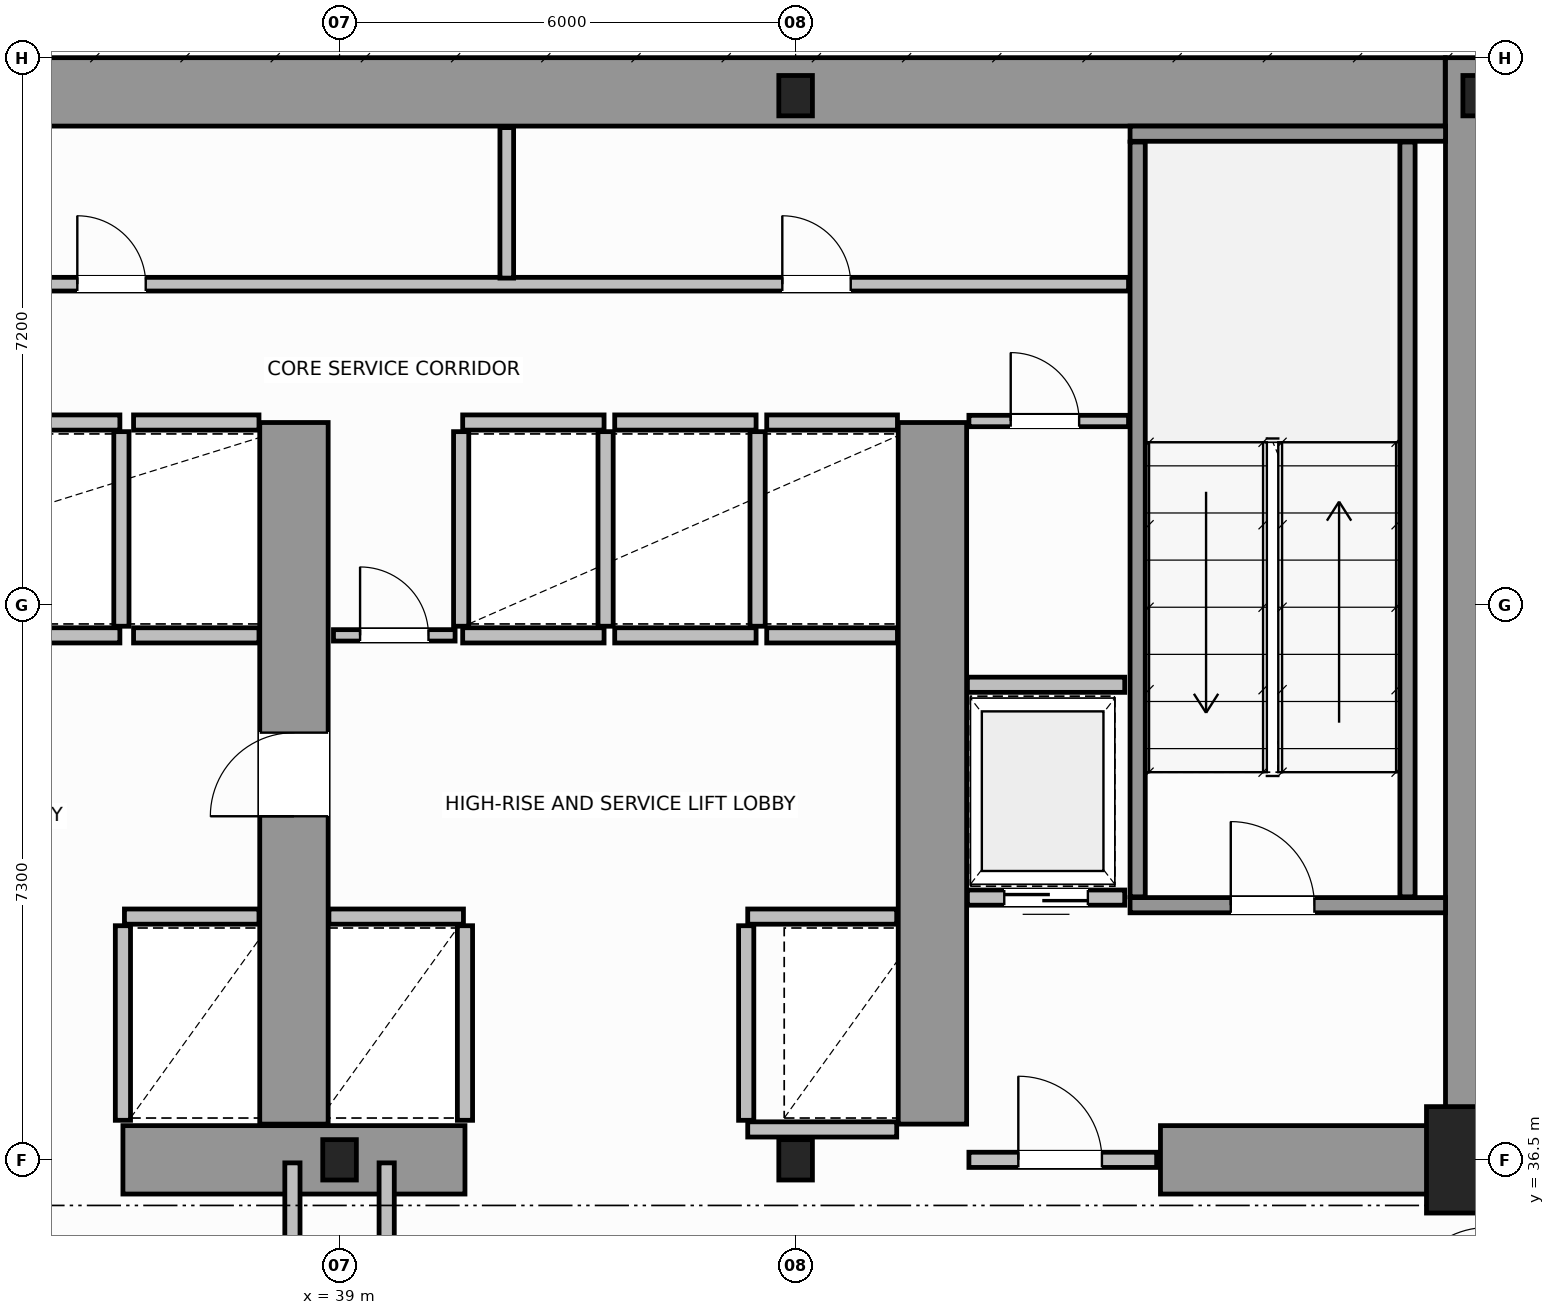
"""IFC4 building model, lengths in metres.
Left out: names, types, materials, properties, quantities, classifications, styles, units other than length and angle.
Written with IfcOpenShell. Run it as: python <this file> out.ifc"""

import sys

from ifc_helpers import new_model, si_unit, direction, frame, frame_2d, origin, origin_2d, place, context, subcontext, project, spatial, rectangle, i_section, extrude, source, transform, mapped, element, fill, save


model = new_model("IFC4")
c1 = context("Model", 3, precision=1e-05, world=origin(), true_north=direction((0.0, 1.0)))
c2 = subcontext(c1, "Body", "Model", "MODEL_VIEW")
j1 = project(units=[si_unit("LENGTHUNIT", "METRE"), si_unit("PLANEANGLEUNIT", "RADIAN")], contexts=[c1])
p1 = place(None, origin())
s1 = spatial("IfcSite", under=j1, at=p1, CompositionType="ELEMENT")
p2 = place(p1, origin())
s2 = spatial("IfcBuilding", under=s1, at=p2, CompositionType="ELEMENT")
p3 = place(p2, frame((0.0, 0.0, 83.4)))
s3 = spatial("IfcBuildingStorey", under=s2, at=p3, CompositionType="ELEMENT", Elevation=83.4)
m1 = source(origin(), c2, "Body", "SweptSolid", [
    extrude(i_section(OverallWidth=0.442, OverallDepth=0.531, WebThickness=0.065, FlangeThickness=0.076, FilletRadius=0.015, at=origin_2d()), origin(), (0.0, 0.0, 1.0), 4.8),
])
for number, where, z_axis, x_axis in (
    (1, (39.0, 36.5, 0.0), (0.0, 0.0, 1.0), (1.0, 0.0, 0.0)),
    (2, (45.0, 36.5, 0.0), (0.0, 0.0, 1.0), (1.0, 0.0, 0.0)),
):
    element("IfcColumn", number, at=place(p3, frame(where, z_axis=z_axis, x_axis=x_axis)), inside=s3, PredefinedType="COLUMN", context=c2, shape_type="MappedRepresentation", body=[
        mapped(m1, transform((0.0, 0.0, 0.0), scale=1.0)),
    ])
m2 = source(origin(), c2, "Body", "SweptSolid", [
    extrude(rectangle(XDim=1.4, YDim=1.4, at=origin_2d()), origin(), (0.0, 0.0, 1.0), 4.8),
])
p4 = place(p3, frame((54.0, 36.5, 0.0), z_axis=(0.0, 0.0, 1.0), x_axis=(1.0, 0.0, 0.0)))
e3 = element("IfcColumn", 3, at=p4, inside=s3, PredefinedType="COLUMN", context=c2, shape_type="MappedRepresentation", body=[
    mapped(m2, transform((0.0, 0.0, 0.0), scale=1.0)),
])
for number, where, z_axis, x_axis in (
    (4, (45.0, 50.5, 0.0), (0.0, 0.0, 1.0), (1.0, 0.0, 0.0)),
    (5, (54.0, 50.5, 0.0), (0.0, 0.0, 1.0), (1.0, 0.0, 0.0)),
):
    element("IfcColumn", number, at=place(p3, frame(where, z_axis=z_axis, x_axis=x_axis)), inside=s3, PredefinedType="COLUMN", context=c2, shape_type="MappedRepresentation", body=[
        mapped(m1, transform((0.0, 0.0, 0.0), scale=1.0)),
    ])
p5 = place(p3, frame((34.002, 50.55, 0.0), z_axis=(0.0, 0.0, 1.0), x_axis=(1.0, 0.0, 0.0)))
e6 = element("IfcWall", 6, at=p5, inside=s3, PredefinedType="SHEAR", context=c2, shape_type="SweptSolid", body=[
    extrude(rectangle(XDim=19.544, YDim=0.9, at=frame_2d((9.772, 0.0))), origin(), (0.0, 0.0, 1.0), 4.8),
])
p6 = place(p3, frame((54.0, 36.5, 0.0), z_axis=(0.0, 0.0, 1.0), x_axis=(0.0, 1.0, 0.0)))
e7 = element("IfcWall", 7, at=p6, inside=s3, PredefinedType="SHEAR", context=c2, shape_type="SweptSolid", body=[
    extrude(rectangle(XDim=14.5, YDim=0.9, at=frame_2d((7.25, 0.0))), origin(), (0.0, 0.0, 1.0), 4.8),
])
p7 = place(p3, frame((36.15, 36.5, 0.0), z_axis=(0.0, 0.0, 1.0), x_axis=(1.0, 0.0, 0.0)))
e8 = element("IfcWall", 8, at=p7, inside=s3, PredefinedType="SHEAR", context=c2, shape_type="SweptSolid", body=[
    extrude(rectangle(XDim=4.5, YDim=0.9, at=frame_2d((2.25, 0.0))), origin(), (0.0, 0.0, 1.0), 4.8),
])
p8 = place(p3, frame((49.8, 36.5, 0.0), z_axis=(0.0, 0.0, 1.0), x_axis=(1.0, 0.0, 0.0)))
e9 = element("IfcWall", 9, at=p8, inside=s3, PredefinedType="SHEAR", context=c2, shape_type="SweptSolid", body=[
    extrude(rectangle(XDim=3.73, YDim=0.9, at=frame_2d((1.865, 0.0))), origin(), (0.0, 0.0, 1.0), 3.34),
])
p9 = place(p3, frame((38.4, 36.97, 0.0), z_axis=(0.0, 0.0, 1.0), x_axis=(0.0, 1.0, 0.0)))
e10 = element("IfcWall", 10, at=p9, inside=s3, PredefinedType="SHEAR", context=c2, shape_type="SweptSolid", body=[
    extrude(rectangle(XDim=9.23, YDim=0.9, at=frame_2d((4.615, 0.0))), origin(), (0.0, 0.0, 1.0), 4.8),
])
p10 = place(p9, frame((4.05, 0.0, 0.0)))
e11 = element("IfcOpeningElement", 11, at=p10, cuts=e10, PredefinedType="OPENING", context=c2, shape_type="SweptSolid", body=[
    extrude(rectangle(XDim=1.1, YDim=2.15, at=frame_2d((0.55, 1.075))), frame((0.0, 0.46, 0.0), z_axis=(0.0, -1.0, 0.0), x_axis=(1.0, 0.0, 0.0)), (0.0, 0.0, 1.0), 0.92),
])
p11 = place(p3, frame((46.8, 36.97, 0.0), z_axis=(0.0, 0.0, 1.0), x_axis=(0.0, 1.0, 0.0)))
e12 = element("IfcWall", 12, at=p11, inside=s3, PredefinedType="SHEAR", context=c2, shape_type="SweptSolid", body=[
    extrude(rectangle(XDim=9.23, YDim=0.9, at=frame_2d((4.615, 0.0))), origin(), (0.0, 0.0, 1.0), 4.8),
])
p12 = place(p3, frame((49.4, 39.85, 0.0), z_axis=(0.0, 0.0, 1.0), x_axis=(1.0, 0.0, 0.0)))
e13 = element("IfcWall", 13, at=p12, inside=s3, PredefinedType="SOLIDWALL", context=c2, shape_type="SweptSolid", body=[
    extrude(rectangle(XDim=4.15, YDim=0.2, at=frame_2d((2.075, 0.0))), origin(), (0.0, 0.0, 1.0), 4.8),
])
p13 = place(p12, frame((1.325, 0.0, 0.0)))
e14 = element("IfcOpeningElement", 14, at=p13, cuts=e13, PredefinedType="OPENING", context=c2, shape_type="SweptSolid", body=[
    extrude(rectangle(XDim=1.1, YDim=2.15, at=frame_2d((0.55, 1.075))), frame((0.0, 0.11, 0.0), z_axis=(0.0, -1.0, 0.0), x_axis=(1.0, 0.0, 0.0)), (0.0, 0.0, 1.0), 0.22),
])
p14 = place(p3, frame((49.4, 50.0, 0.0), z_axis=(0.0, 0.0, 1.0), x_axis=(1.0, 0.0, 0.0)))
e15 = element("IfcWall", 15, at=p14, inside=s3, PredefinedType="SOLIDWALL", context=c2, shape_type="SweptSolid", body=[
    extrude(rectangle(XDim=4.15, YDim=0.2, at=frame_2d((2.075, 0.0))), origin(), (0.0, 0.0, 1.0), 4.8),
])
for number, where, z_axis, x_axis in (
    (16, (49.5, 39.96, 0.0), (0.0, 0.0, 1.0), (0.0, 1.0, 0.0)),
    (17, (53.05, 39.96, 0.0), (0.0, 0.0, 1.0), (0.0, 1.0, 0.0)),
):
    element("IfcWall", number, at=place(p3, frame(where, z_axis=z_axis, x_axis=x_axis)), inside=s3, PredefinedType="SOLIDWALL", context=c2, shape_type="SweptSolid", body=[
        extrude(rectangle(XDim=9.93, YDim=0.2, at=frame_2d((4.965, 0.0))), origin(), (0.0, 0.0, 1.0), 4.8),
    ])
p15 = place(p3, frame((47.28, 36.5, 0.0), z_axis=(0.0, 0.0, 1.0), x_axis=(1.0, 0.0, 0.0)))
e18 = element("IfcWall", 18, at=p15, inside=s3, PredefinedType="SOLIDWALL", context=c2, shape_type="SweptSolid", body=[
    extrude(rectangle(XDim=2.47, YDim=0.2, at=frame_2d((1.235, 0.0))), origin(), (0.0, 0.0, 1.0), 3.33),
])
p16 = place(p15, frame((0.65, 0.0, 0.0)))
e19 = element("IfcOpeningElement", 19, at=p16, cuts=e18, PredefinedType="OPENING", context=c2, shape_type="SweptSolid", body=[
    extrude(rectangle(XDim=1.1, YDim=2.15, at=frame_2d((0.55, 1.075))), frame((0.0, 0.11, 0.0), z_axis=(0.0, -1.0, 0.0), x_axis=(1.0, 0.0, 0.0)), (0.0, 0.0, 1.0), 0.22),
])
p17 = place(p3, frame((36.17, 39.7, 0.0), z_axis=(0.0, 0.0, 1.0), x_axis=(1.0, 0.0, 0.0)))
e20 = element("IfcWall", 20, at=p17, inside=s3, PredefinedType="SOLIDWALL", context=c2, shape_type="SweptSolid", body=[
    extrude(rectangle(XDim=1.77, YDim=0.2, at=frame_2d((0.885, 0.0))), origin(), (0.0, 0.0, 1.0), 4.54),
])
p18 = place(p3, frame((36.15, 37.02, 0.0), z_axis=(0.0, 0.0, 1.0), x_axis=(0.0, 1.0, 0.0)))
e21 = element("IfcWall", 21, at=p18, inside=s3, PredefinedType="SOLIDWALL", context=c2, shape_type="SweptSolid", body=[
    extrude(rectangle(XDim=2.56, YDim=0.2, at=frame_2d((1.28, 0.0))), origin(), (0.0, 0.0, 1.0), 4.54),
])
for number, where, z_axis, x_axis in (
    (22, (34.19, 43.4, 0.0), (0.0, 0.0, 1.0), (1.0, 0.0, 0.0)),
    (23, (34.19, 46.2, 0.0), (0.0, 0.0, 1.0), (1.0, 0.0, 0.0)),
):
    element("IfcWall", number, at=place(p3, frame(where, z_axis=z_axis, x_axis=x_axis)), inside=s3, PredefinedType="SOLIDWALL", context=c2, shape_type="SweptSolid", body=[
        extrude(rectangle(XDim=1.92, YDim=0.2, at=frame_2d((0.96, 0.0))), origin(), (0.0, 0.0, 1.0), 4.54),
    ])
p19 = place(p3, frame((36.13, 43.52, 0.0), z_axis=(0.0, 0.0, 1.0), x_axis=(0.0, 1.0, 0.0)))
e24 = element("IfcWall", 24, at=p19, inside=s3, PredefinedType="SOLIDWALL", context=c2, shape_type="SweptSolid", body=[
    extrude(rectangle(XDim=2.56, YDim=0.2, at=frame_2d((1.28, 0.0))), origin(), (0.0, 0.0, 1.0), 4.54),
])
for number, where, z_axis, x_axis in (
    (25, (36.29, 43.4, 0.0), (0.0, 0.0, 1.0), (1.0, 0.0, 0.0)),
    (26, (36.29, 46.2, 0.0), (0.0, 0.0, 1.0), (1.0, 0.0, 0.0)),
):
    element("IfcWall", number, at=place(p3, frame(where, z_axis=z_axis, x_axis=x_axis)), inside=s3, PredefinedType="SOLIDWALL", context=c2, shape_type="SweptSolid", body=[
        extrude(rectangle(XDim=1.65, YDim=0.2, at=frame_2d((0.825, 0.0))), origin(), (0.0, 0.0, 1.0), 4.54),
    ])
p20 = place(p3, frame((38.86, 39.7, 0.0), z_axis=(0.0, 0.0, 1.0), x_axis=(1.0, 0.0, 0.0)))
e27 = element("IfcWall", 27, at=p20, inside=s3, PredefinedType="SOLIDWALL", context=c2, shape_type="SweptSolid", body=[
    extrude(rectangle(XDim=1.77, YDim=0.2, at=frame_2d((0.885, 0.0))), origin(), (0.0, 0.0, 1.0), 4.54),
])
p21 = place(p3, frame((40.65, 37.02, 0.0), z_axis=(0.0, 0.0, 1.0), x_axis=(0.0, 1.0, 0.0)))
e28 = element("IfcWall", 28, at=p21, inside=s3, PredefinedType="SOLIDWALL", context=c2, shape_type="SweptSolid", body=[
    extrude(rectangle(XDim=2.56, YDim=0.2, at=frame_2d((1.28, 0.0))), origin(), (0.0, 0.0, 1.0), 4.54),
])
p22 = place(p3, frame((44.37, 39.7, 0.0), z_axis=(0.0, 0.0, 1.0), x_axis=(1.0, 0.0, 0.0)))
e29 = element("IfcWall", 29, at=p22, inside=s3, PredefinedType="SOLIDWALL", context=c2, shape_type="SweptSolid", body=[
    extrude(rectangle(XDim=1.96, YDim=0.2, at=frame_2d((0.98, 0.0))), origin(), (0.0, 0.0, 1.0), 4.54),
])
p23 = place(p3, frame((44.37, 36.9, 0.0), z_axis=(0.0, 0.0, 1.0), x_axis=(1.0, 0.0, 0.0)))
e30 = element("IfcWall", 30, at=p23, inside=s3, PredefinedType="SOLIDWALL", context=c2, shape_type="SweptSolid", body=[
    extrude(rectangle(XDim=1.96, YDim=0.2, at=frame_2d((0.98, 0.0))), origin(), (0.0, 0.0, 1.0), 3.33),
])
p24 = place(p3, frame((44.35, 37.02, 0.0), z_axis=(0.0, 0.0, 1.0), x_axis=(0.0, 1.0, 0.0)))
e31 = element("IfcWall", 31, at=p24, inside=s3, PredefinedType="SOLIDWALL", context=c2, shape_type="SweptSolid", body=[
    extrude(rectangle(XDim=2.56, YDim=0.2, at=frame_2d((1.28, 0.0))), origin(), (0.0, 0.0, 1.0), 4.54),
])
for number, where, z_axis, x_axis in (
    (32, (40.62, 43.4, 0.0), (0.0, 0.0, 1.0), (1.0, 0.0, 0.0)),
    (33, (40.62, 46.2, 0.0), (0.0, 0.0, 1.0), (1.0, 0.0, 0.0)),
):
    element("IfcWall", number, at=place(p3, frame(where, z_axis=z_axis, x_axis=x_axis)), inside=s3, PredefinedType="SOLIDWALL", context=c2, shape_type="SweptSolid", body=[
        extrude(rectangle(XDim=1.86, YDim=0.2, at=frame_2d((0.93, 0.0))), origin(), (0.0, 0.0, 1.0), 4.54),
    ])
for number, where, z_axis, x_axis in (
    (34, (40.6, 43.52, 0.0), (0.0, 0.0, 1.0), (0.0, 1.0, 0.0)),
    (35, (42.5, 43.52, 0.0), (0.0, 0.0, 1.0), (0.0, 1.0, 0.0)),
):
    element("IfcWall", number, at=place(p3, frame(where, z_axis=z_axis, x_axis=x_axis)), inside=s3, PredefinedType="SOLIDWALL", context=c2, shape_type="SweptSolid", body=[
        extrude(rectangle(XDim=2.56, YDim=0.2, at=frame_2d((1.28, 0.0))), origin(), (0.0, 0.0, 1.0), 4.54),
    ])
for number, where, z_axis, x_axis in (
    (36, (42.62, 43.4, 0.0), (0.0, 0.0, 1.0), (1.0, 0.0, 0.0)),
    (37, (42.62, 46.2, 0.0), (0.0, 0.0, 1.0), (1.0, 0.0, 0.0)),
):
    element("IfcWall", number, at=place(p3, frame(where, z_axis=z_axis, x_axis=x_axis)), inside=s3, PredefinedType="SOLIDWALL", context=c2, shape_type="SweptSolid", body=[
        extrude(rectangle(XDim=1.86, YDim=0.2, at=frame_2d((0.93, 0.0))), origin(), (0.0, 0.0, 1.0), 4.54),
    ])
p25 = place(p3, frame((44.5, 43.52, 0.0), z_axis=(0.0, 0.0, 1.0), x_axis=(0.0, 1.0, 0.0)))
e38 = element("IfcWall", 38, at=p25, inside=s3, PredefinedType="SOLIDWALL", context=c2, shape_type="SweptSolid", body=[
    extrude(rectangle(XDim=2.56, YDim=0.2, at=frame_2d((1.28, 0.0))), origin(), (0.0, 0.0, 1.0), 4.54),
])
for number, where, z_axis, x_axis in (
    (39, (44.62, 43.4, 0.0), (0.0, 0.0, 1.0), (1.0, 0.0, 0.0)),
    (40, (44.62, 46.2, 0.0), (0.0, 0.0, 1.0), (1.0, 0.0, 0.0)),
):
    element("IfcWall", number, at=place(p3, frame(where, z_axis=z_axis, x_axis=x_axis)), inside=s3, PredefinedType="SOLIDWALL", context=c2, shape_type="SweptSolid", body=[
        extrude(rectangle(XDim=1.72, YDim=0.2, at=frame_2d((0.86, 0.0))), origin(), (0.0, 0.0, 1.0), 4.54),
    ])
p26 = place(p3, frame((47.26, 39.95, 0.0), z_axis=(0.0, 0.0, 1.0), x_axis=(1.0, 0.0, 0.0)))
e41 = element("IfcWall", 41, at=p26, inside=s3, PredefinedType="SOLIDWALL", context=c2, shape_type="SweptSolid", body=[
    extrude(rectangle(XDim=2.07, YDim=0.2, at=frame_2d((1.035, 0.0))), origin(), (0.0, 0.0, 1.0), 4.54),
])
p27 = place(p26, frame((0.485, 0.0, 0.0)))
e42 = element("IfcOpeningElement", 42, at=p27, cuts=e41, PredefinedType="OPENING", context=c2, shape_type="SweptSolid", body=[
    extrude(rectangle(XDim=1.1, YDim=2.15, at=frame_2d((0.55, 1.075))), frame((0.0, 0.11, 0.0), z_axis=(0.0, -1.0, 0.0), x_axis=(1.0, 0.0, 0.0)), (0.0, 0.0, 1.0), 0.22),
])
p28 = place(p3, frame((47.26, 42.75, 0.0), z_axis=(0.0, 0.0, 1.0), x_axis=(1.0, 0.0, 0.0)))
e43 = element("IfcWall", 43, at=p28, inside=s3, PredefinedType="SOLIDWALL", context=c2, shape_type="SweptSolid", body=[
    extrude(rectangle(XDim=2.07, YDim=0.2, at=frame_2d((1.035, 0.0))), origin(), (0.0, 0.0, 1.0), 4.54),
])
p29 = place(p3, frame((47.28, 46.22, 0.0), z_axis=(0.0, 0.0, 1.0), x_axis=(1.0, 0.0, 0.0)))
e44 = element("IfcWall", 44, at=p29, inside=s3, PredefinedType="PARTITIONING", context=c2, shape_type="SweptSolid", body=[
    extrude(rectangle(XDim=2.1, YDim=0.15, at=frame_2d((1.05, 0.0))), origin(), (0.0, 0.0, 1.0), 4.54),
])
p30 = place(p29, frame((0.55, 0.0, 0.0)))
e45 = element("IfcOpeningElement", 45, at=p30, cuts=e44, PredefinedType="OPENING", context=c2, shape_type="SweptSolid", body=[
    extrude(rectangle(XDim=0.9, YDim=2.1, at=frame_2d((0.45, 1.05))), frame((0.0, 0.085, 0.0), z_axis=(0.0, -1.0, 0.0), x_axis=(1.0, 0.0, 0.0)), (0.0, 0.0, 1.0), 0.17),
])
p31 = place(p3, frame((38.92, 43.4, 0.0), z_axis=(0.0, 0.0, 1.0), x_axis=(1.0, 0.0, 0.0)))
e46 = element("IfcWall", 46, at=p31, inside=s3, PredefinedType="PARTITIONING", context=c2, shape_type="SweptSolid", body=[
    extrude(rectangle(XDim=1.6, YDim=0.15, at=frame_2d((0.8, 0.0))), origin(), (0.0, 0.0, 1.0), 4.54),
])
p32 = place(p31, frame((0.35, 0.0, 0.0)))
e47 = element("IfcOpeningElement", 47, at=p32, cuts=e46, PredefinedType="OPENING", context=c2, shape_type="SweptSolid", body=[
    extrude(rectangle(XDim=0.9, YDim=2.1, at=frame_2d((0.45, 1.05))), frame((0.0, 0.085, 0.0), z_axis=(0.0, -1.0, 0.0), x_axis=(1.0, 0.0, 0.0)), (0.0, 0.0, 1.0), 0.17),
])
p33 = place(p3, frame((18.62, 48.02, 0.0), z_axis=(0.0, 0.0, 1.0), x_axis=(1.0, 0.0, 0.0)))
e48 = element("IfcWall", 48, at=p33, inside=s3, PredefinedType="PLUMBINGWALL", context=c2, shape_type="SweptSolid", body=[
    extrude(rectangle(XDim=30.76, YDim=0.18, at=frame_2d((15.38, 0.0))), origin(), (0.0, 0.0, 1.0), 4.54),
])
p34 = place(p33, frame((1.955, 0.0, 0.0)))
e49 = element("IfcOpeningElement", 49, at=p34, cuts=e48, PredefinedType="OPENING", context=c2, shape_type="SweptSolid", body=[
    extrude(rectangle(XDim=0.9, YDim=2.15, at=frame_2d((0.45, 1.075))), frame((0.0, 0.1, 0.0), z_axis=(0.0, -1.0, 0.0), x_axis=(1.0, 0.0, 0.0)), (0.0, 0.0, 1.0), 0.2),
])
p35 = place(p33, frame((8.03, 0.0, 0.0)))
e50 = element("IfcOpeningElement", 50, at=p35, cuts=e48, PredefinedType="OPENING", context=c2, shape_type="SweptSolid", body=[
    extrude(rectangle(XDim=0.9, YDim=2.15, at=frame_2d((0.45, 1.075))), frame((0.0, 0.1, 0.0), z_axis=(0.0, -1.0, 0.0), x_axis=(1.0, 0.0, 0.0)), (0.0, 0.0, 1.0), 0.2),
])
p36 = place(p33, frame((16.93, 0.0, 0.0)))
e51 = element("IfcOpeningElement", 51, at=p36, cuts=e48, PredefinedType="OPENING", context=c2, shape_type="SweptSolid", body=[
    extrude(rectangle(XDim=0.9, YDim=2.15, at=frame_2d((0.45, 1.075))), frame((0.0, 0.1, 0.0), z_axis=(0.0, -1.0, 0.0), x_axis=(1.0, 0.0, 0.0)), (0.0, 0.0, 1.0), 0.2),
])
p37 = place(p33, frame((26.205, 0.0, 0.0)))
e52 = element("IfcOpeningElement", 52, at=p37, cuts=e48, PredefinedType="OPENING", context=c2, shape_type="SweptSolid", body=[
    extrude(rectangle(XDim=0.9, YDim=2.15, at=frame_2d((0.45, 1.075))), frame((0.0, 0.1, 0.0), z_axis=(0.0, -1.0, 0.0), x_axis=(1.0, 0.0, 0.0)), (0.0, 0.0, 1.0), 0.2),
])
p38 = place(p3, frame((41.2, 48.1, 0.0), z_axis=(0.0, 0.0, 1.0), x_axis=(0.0, 1.0, 0.0)))
e53 = element("IfcWall", 53, at=p38, inside=s3, PredefinedType="PLUMBINGWALL", context=c2, shape_type="SweptSolid", body=[
    extrude(rectangle(XDim=1.98, YDim=0.18, at=frame_2d((0.99, 0.0))), origin(), (0.0, 0.0, 1.0), 4.54),
])
for number, where, z_axis, x_axis in (
    (54, (38.38, 28.16, 0.0), (0.0, 0.0, 1.0), (0.0, 1.0, 0.0)),
    (55, (39.62, 28.16, 0.0), (0.0, 0.0, 1.0), (0.0, 1.0, 0.0)),
):
    element("IfcWall", number, at=place(p3, frame(where, z_axis=z_axis, x_axis=x_axis)), inside=s3, PredefinedType="SOLIDWALL", context=c2, shape_type="SweptSolid", body=[
        extrude(rectangle(XDim=8.3, YDim=0.2, at=frame_2d((4.15, 0.0))), origin(), (0.0, 0.0, 1.0), 4.54),
    ])
m3 = source(origin(), c2, "Body", "SweptSolid", [
    extrude(rectangle(XDim=1.1, YDim=2.15, at=frame_2d((0.55, 1.075))), frame((0.0, 0.025, 0.0), z_axis=(0.0, -1.0, 0.0), x_axis=(1.0, 0.0, 0.0)), (0.0, 0.0, 1.0), 0.05),
])
p39 = place(p13, origin())
e56 = element("IfcDoor", 56, at=p39, inside=s3, OperationType="SINGLE_SWING_RIGHT", PredefinedType="DOOR", context=c2, shape_type="MappedRepresentation", body=[
    mapped(m3, transform((0.0, 0.0, 0.0), scale=1.0)),
])
fill(e14, e56)
p40 = place(p16, origin())
e57 = element("IfcDoor", 57, at=p40, inside=s3, OperationType="SINGLE_SWING_LEFT", PredefinedType="DOOR", context=c2, shape_type="MappedRepresentation", body=[
    mapped(m3, transform((0.0, 0.0, 0.0), scale=1.0)),
])
fill(e19, e57)
p41 = place(p27, origin())
e58 = element("IfcDoor", 58, at=p41, inside=s3, OperationType="DOUBLE_DOOR_SLIDING", PredefinedType="DOOR", context=c2, shape_type="MappedRepresentation", body=[
    mapped(m3, transform((0.0, 0.0, 0.0), scale=1.0)),
])
fill(e42, e58)
p42 = place(p10, origin())
e59 = element("IfcDoor", 59, at=p42, inside=s3, OperationType="SINGLE_SWING_RIGHT", PredefinedType="DOOR", context=c2, shape_type="MappedRepresentation", body=[
    mapped(m3, transform((0.0, 0.0, 0.0), scale=1.0)),
])
fill(e11, e59)
m4 = source(origin(), c2, "Body", "SweptSolid", [
    extrude(rectangle(XDim=0.9, YDim=2.1, at=frame_2d((0.45, 1.05))), frame((0.0, 0.025, 0.0), z_axis=(0.0, -1.0, 0.0), x_axis=(1.0, 0.0, 0.0)), (0.0, 0.0, 1.0), 0.05),
])
p43 = place(p30, origin())
e60 = element("IfcDoor", 60, at=p43, inside=s3, OperationType="SINGLE_SWING_RIGHT", PredefinedType="DOOR", context=c2, shape_type="MappedRepresentation", body=[
    mapped(m4, transform((0.0, 0.0, 0.0), scale=1.0)),
])
fill(e45, e60)
p44 = place(p32, origin())
e61 = element("IfcDoor", 61, at=p44, inside=s3, OperationType="SINGLE_SWING_LEFT", PredefinedType="DOOR", context=c2, shape_type="MappedRepresentation", body=[
    mapped(m4, transform((0.0, 0.0, 0.0), scale=1.0)),
])
fill(e47, e61)
m5 = source(origin(), c2, "Body", "SweptSolid", [
    extrude(rectangle(XDim=0.9, YDim=2.15, at=frame_2d((0.45, 1.075))), frame((0.0, 0.025, 0.0), z_axis=(0.0, -1.0, 0.0), x_axis=(1.0, 0.0, 0.0)), (0.0, 0.0, 1.0), 0.05),
])
p45 = place(p36, origin())
e62 = element("IfcDoor", 62, at=p45, inside=s3, OperationType="SINGLE_SWING_LEFT", PredefinedType="DOOR", context=c2, shape_type="MappedRepresentation", body=[
    mapped(m5, transform((0.0, 0.0, 0.0), scale=1.0)),
])
fill(e51, e62)
p46 = place(p37, origin())
e63 = element("IfcDoor", 63, at=p46, inside=s3, OperationType="SINGLE_SWING_RIGHT", PredefinedType="DOOR", context=c2, shape_type="MappedRepresentation", body=[
    mapped(m5, transform((0.0, 0.0, 0.0), scale=1.0)),
])
fill(e52, e63)
save(model, sys.argv[1])
